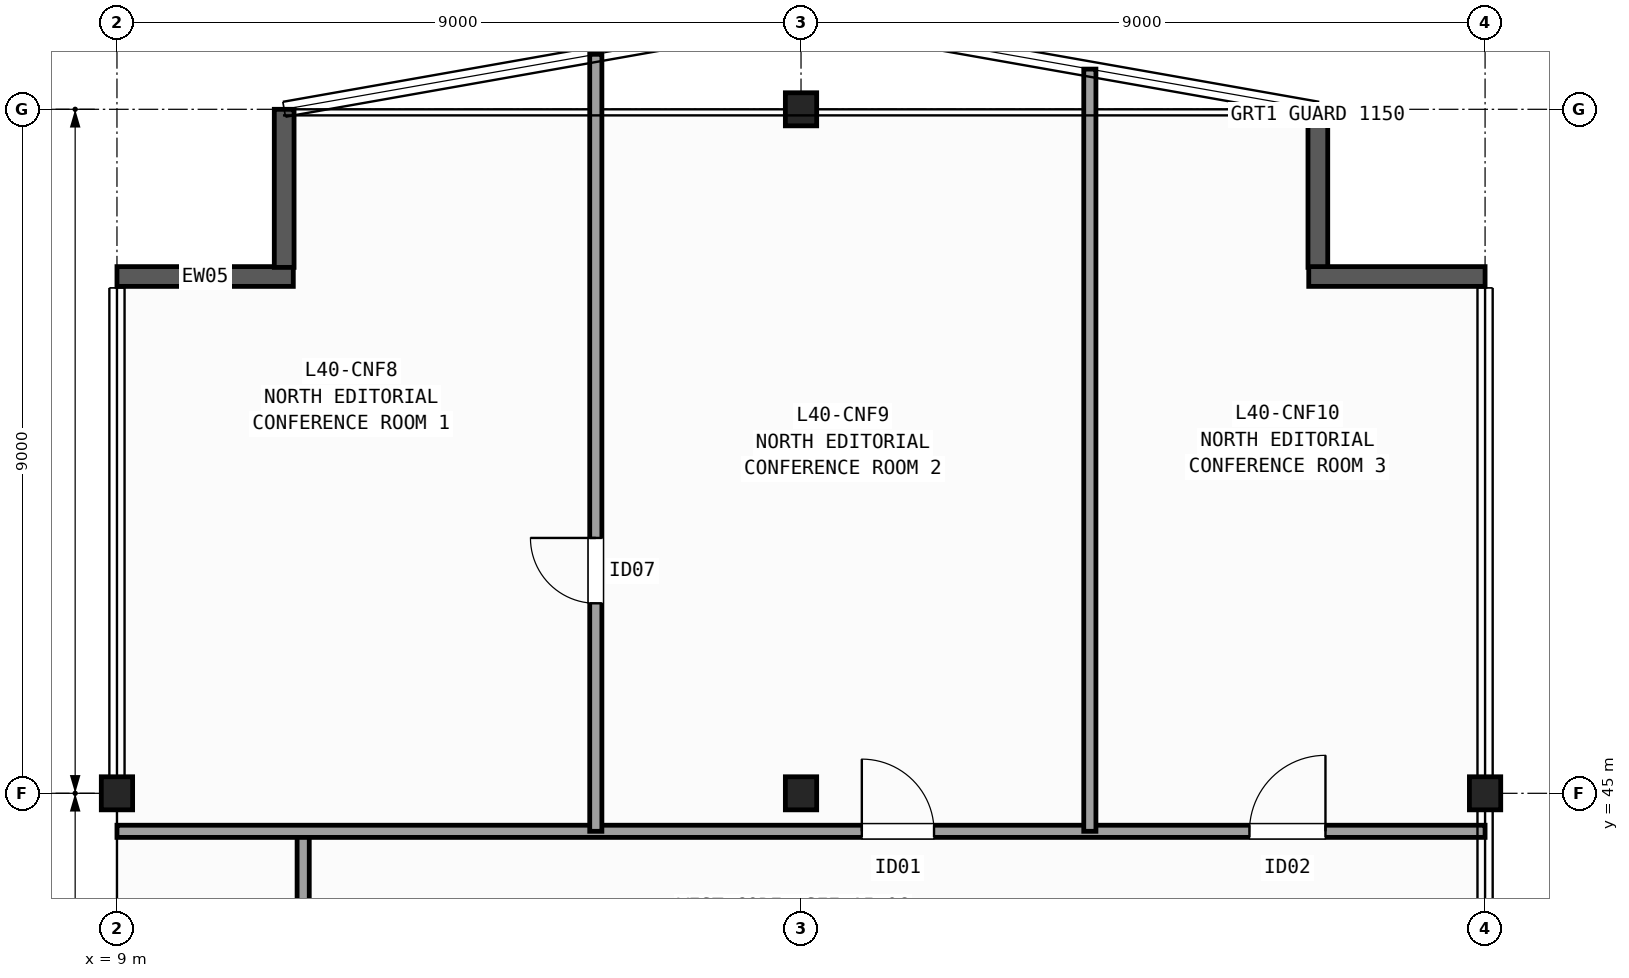
"""IFC4 building model, lengths in metres.
Left out: names, types, materials, properties, quantities, classifications, styles, units other than length and angle.
Written with IfcOpenShell. Run it as: python <this file> out.ifc"""

import sys

from ifc_helpers import new_model, si_unit, direction, frame, frame_2d, origin, origin_2d, place, context, subcontext, project, spatial, rectangle, i_section, extrude, element, fill, save


model = new_model("IFC4")
c1 = context("Model", 3, precision=1e-05, world=origin(), true_north=direction((0.0, 1.0)))
c2 = subcontext(c1, "Body", "Model", "MODEL_VIEW")
j1 = project(units=[si_unit("LENGTHUNIT", "METRE"), si_unit("PLANEANGLEUNIT", "RADIAN")], contexts=[c1])
p1 = place(None, origin())
s1 = spatial("IfcSite", under=j1, at=p1, CompositionType="ELEMENT")
p2 = place(p1, origin())
s2 = spatial("IfcBuilding", under=s1, at=p2, CompositionType="ELEMENT")
p3 = place(p2, frame((0.0, 0.0, 161.8)))
s3 = spatial("IfcBuildingStorey", under=s2, at=p3, CompositionType="ELEMENT", Elevation=161.8)
for number, where, z_axis, x_axis in (
    (1, (9.0, 45.0, 0.0), (0.0, 0.0, 1.0), (1.0, 0.0, 0.0)),
    (2, (18.0, 45.0, 0.0), (0.0, 0.0, 1.0), (1.0, 0.0, 0.0)),
    (3, (18.0, 54.0, 0.0), (0.0, 0.0, 1.0), (1.0, 0.0, 0.0)),
    (4, (27.0, 45.0, 0.0), (0.0, 0.0, 1.0), (1.0, 0.0, 0.0)),
):
    element("IfcColumn", number, at=place(p3, frame(where, z_axis=z_axis, x_axis=x_axis)), inside=s3, PredefinedType="COLUMN", context=c2, shape_type="SweptSolid", body=[
        extrude(i_section(OverallWidth=0.412, OverallDepth=0.435, WebThickness=0.036, FlangeThickness=0.057, FilletRadius=0.015, at=origin_2d()), origin(), (0.0, 0.0, 1.0), 3.7),
    ])
p4 = place(p3, frame((9.0, 51.8, 0.0), z_axis=(0.0, 0.0, 1.0), x_axis=(1.0, 0.0, 0.0)))
e5 = element("IfcWall", 5, at=p4, inside=s3, PredefinedType="SOLIDWALL", context=c2, shape_type="SweptSolid", body=[
    extrude(rectangle(XDim=2.32, YDim=0.26, at=frame_2d((1.16, 0.0))), origin(), (0.0, 0.0, 1.0), 3.42),
])
for number, where, z_axis, x_axis in (
    (6, (11.2, 51.92, 0.0), (0.0, 0.0, 1.0), (0.0, 1.0, 0.0)),
    (7, (24.8, 54.0, 0.0), (0.0, 0.0, 1.0), (0.0, -1.0, 0.0)),
):
    element("IfcWall", number, at=place(p3, frame(where, z_axis=z_axis, x_axis=x_axis)), inside=s3, PredefinedType="SOLIDWALL", context=c2, shape_type="SweptSolid", body=[
        extrude(rectangle(XDim=2.08, YDim=0.26, at=frame_2d((1.04, 0.0))), origin(), (0.0, 0.0, 1.0), 3.42),
    ])
p5 = place(p3, frame((24.68, 51.8, 0.0), z_axis=(0.0, 0.0, 1.0), x_axis=(1.0, 0.0, 0.0)))
e8 = element("IfcWall", 8, at=p5, inside=s3, PredefinedType="SOLIDWALL", context=c2, shape_type="SweptSolid", body=[
    extrude(rectangle(XDim=2.32, YDim=0.26, at=frame_2d((1.16, 0.0))), origin(), (0.0, 0.0, 1.0), 3.42),
])
p6 = place(p3, frame((11.45, 42.4, 0.0), z_axis=(0.0, 0.0, 1.0), x_axis=(0.0, 1.0, 0.0)))
e9 = element("IfcWall", 9, at=p6, inside=s3, PredefinedType="PARTITIONING", context=c2, shape_type="SweptSolid", body=[
    extrude(rectangle(XDim=2.1, YDim=0.16, at=frame_2d((1.05, 0.0))), origin(), (0.0, 0.0, 1.0), 3.42),
])
p7 = place(p3, frame((9.0, 44.5, 0.0), z_axis=(0.0, 0.0, 1.0), x_axis=(1.0, 0.0, 0.0)))
e10 = element("IfcWall", 10, at=p7, inside=s3, PredefinedType="PARTITIONING", context=c2, shape_type="SweptSolid", body=[
    extrude(rectangle(XDim=18.0, YDim=0.16, at=frame_2d((9.0, 0.0))), origin(), (0.0, 0.0, 1.0), 2.634),
])
p8 = place(p7, frame((9.8, 0.0, 0.0)))
e11 = element("IfcOpeningElement", 11, at=p8, cuts=e10, PredefinedType="OPENING", context=c2, shape_type="SweptSolid", body=[
    extrude(rectangle(XDim=0.95, YDim=2.1, at=frame_2d((0.475, 1.05))), frame((0.0, 0.09, 0.0), z_axis=(0.0, -1.0, 0.0), x_axis=(1.0, 0.0, 0.0)), (0.0, 0.0, 1.0), 0.18),
])
p9 = place(p7, frame((14.9, 0.0, 0.0)))
e12 = element("IfcOpeningElement", 12, at=p9, cuts=e10, PredefinedType="OPENING", context=c2, shape_type="SweptSolid", body=[
    extrude(rectangle(XDim=1.0, YDim=2.1, at=frame_2d((0.5, 1.05))), frame((0.0, 0.09, 0.0), z_axis=(0.0, -1.0, 0.0), x_axis=(1.0, 0.0, 0.0)), (0.0, 0.0, 1.0), 0.18),
])
p10 = place(p3, frame((15.3, 44.5, 0.0), z_axis=(0.0, 0.0, 1.0), x_axis=(0.0, 1.0, 0.0)))
e13 = element("IfcWall", 13, at=p10, inside=s3, PredefinedType="PARTITIONING", context=c2, shape_type="SweptSolid", body=[
    extrude(rectangle(XDim=10.224, YDim=0.16, at=frame_2d((5.112, 0.0))), origin(), (0.0, 0.0, 1.0), 3.42),
])
p11 = place(p10, frame((3.0, 0.0, 0.0)))
e14 = element("IfcOpeningElement", 14, at=p11, cuts=e13, PredefinedType="OPENING", context=c2, shape_type="SweptSolid", body=[
    extrude(rectangle(XDim=0.86, YDim=2.05, at=frame_2d((0.43, 1.025))), frame((0.0, 0.09, 0.0), z_axis=(0.0, -1.0, 0.0), x_axis=(1.0, 0.0, 0.0)), (0.0, 0.0, 1.0), 0.18),
])
p12 = place(p3, frame((21.8, 44.5, 0.0), z_axis=(0.0, 0.0, 1.0), x_axis=(0.0, 1.0, 0.0)))
e15 = element("IfcWall", 15, at=p12, inside=s3, PredefinedType="PARTITIONING", context=c2, shape_type="SweptSolid", body=[
    extrude(rectangle(XDim=10.029, YDim=0.16, at=frame_2d((5.015, 0.0))), origin(), (0.0, 0.0, 1.0), 3.42),
])
p13 = place(p11, origin())
e16 = element("IfcDoor", 16, at=p13, inside=s3, OperationType="SINGLE_SWING_RIGHT", PredefinedType="DOOR", context=c2, shape_type="SweptSolid", body=[
    extrude(rectangle(XDim=0.86, YDim=2.05, at=frame_2d((0.43, 1.025))), frame((0.0, 0.025, 0.0), z_axis=(0.0, -1.0, 0.0), x_axis=(1.0, 0.0, 0.0)), (0.0, 0.0, 1.0), 0.05),
])
fill(e14, e16)
p14 = place(p8, origin())
e17 = element("IfcDoor", 17, at=p14, inside=s3, OperationType="SINGLE_SWING_LEFT", PredefinedType="DOOR", context=c2, shape_type="SweptSolid", body=[
    extrude(rectangle(XDim=0.95, YDim=2.1, at=frame_2d((0.475, 1.05))), frame((0.0, 0.025, 0.0), z_axis=(0.0, -1.0, 0.0), x_axis=(1.0, 0.0, 0.0)), (0.0, 0.0, 1.0), 0.05),
])
fill(e11, e17)
p15 = place(p9, origin())
e18 = element("IfcDoor", 18, at=p15, inside=s3, OperationType="SINGLE_SWING_RIGHT", PredefinedType="DOOR", context=c2, shape_type="SweptSolid", body=[
    extrude(rectangle(XDim=1.0, YDim=2.1, at=frame_2d((0.5, 1.05))), frame((0.0, 0.025, 0.0), z_axis=(0.0, -1.0, 0.0), x_axis=(1.0, 0.0, 0.0)), (0.0, 0.0, 1.0), 0.05),
])
fill(e12, e18)
save(model, sys.argv[1])
